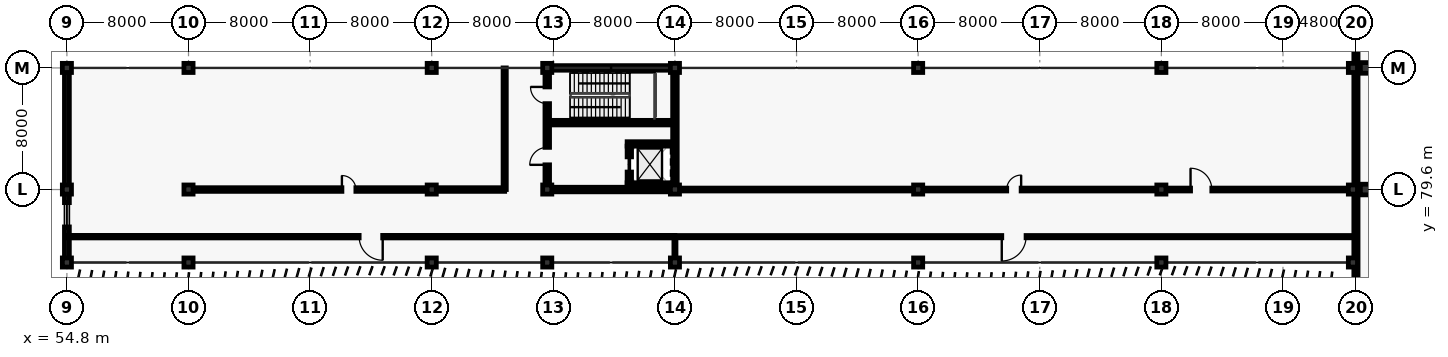
"""IFC4 building model, lengths in metres.
Left out: names, types, materials, properties, quantities, classifications, styles, units other than length and angle.
Written with IfcOpenShell. Run it as: python <this file> out.ifc"""

import sys

from ifc_helpers import new_model, si_unit, direction, frame, frame_2d, origin, origin_2d, place, context, subcontext, project, spatial, rectangle, extrude, element, fill, save


model = new_model("IFC4")
c1 = context("Model", 3, precision=1e-05, world=origin(), true_north=direction((0.0, 1.0)))
c2 = subcontext(c1, "Body", "Model", "MODEL_VIEW")
j1 = project(units=[si_unit("LENGTHUNIT", "METRE"), si_unit("PLANEANGLEUNIT", "RADIAN")], contexts=[c1])
p1 = place(None, origin())
s1 = spatial("IfcSite", under=j1, at=p1, CompositionType="ELEMENT")
p2 = place(p1, origin())
s2 = spatial("IfcBuilding", under=s1, at=p2, CompositionType="ELEMENT")
p3 = place(p2, frame((0.0, 0.0, 5.4)))
s3 = spatial("IfcBuildingStorey", under=s2, at=p3, CompositionType="ELEMENT", Elevation=5.4)
for number, where, z_axis, x_axis in (
    (1, (54.8, 74.8, 0.0), (0.0, 0.0, 1.0), (1.0, 0.0, 0.0)),
    (2, (54.8, 79.6, 0.0), (0.0, 0.0, 1.0), (1.0, 0.0, 0.0)),
    (3, (54.8, 87.6, 0.0), (0.0, 0.0, 1.0), (1.0, 0.0, 0.0)),
    (4, (62.8, 74.8, 0.0), (0.0, 0.0, 1.0), (1.0, 0.0, 0.0)),
    (5, (62.8, 79.6, 0.0), (0.0, 0.0, 1.0), (1.0, 0.0, 0.0)),
    (6, (62.8, 87.6, 0.0), (0.0, 0.0, 1.0), (1.0, 0.0, 0.0)),
    (7, (78.8, 74.8, 0.0), (0.0, 0.0, 1.0), (1.0, 0.0, 0.0)),
    (8, (78.8, 79.6, 0.0), (0.0, 0.0, 1.0), (1.0, 0.0, 0.0)),
    (9, (78.8, 87.6, 0.0), (0.0, 0.0, 1.0), (1.0, 0.0, 0.0)),
    (10, (86.4, 74.8, 0.0), (0.0, 0.0, 1.0), (1.0, 0.0, 0.0)),
    (11, (86.4, 79.6, 0.0), (0.0, 0.0, 1.0), (1.0, 0.0, 0.0)),
    (12, (86.4, 87.6, 0.0), (0.0, 0.0, 1.0), (1.0, 0.0, 0.0)),
    (13, (94.8, 74.8, 0.0), (0.0, 0.0, 1.0), (1.0, 0.0, 0.0)),
    (14, (94.8, 79.6, 0.0), (0.0, 0.0, 1.0), (1.0, 0.0, 0.0)),
    (15, (94.8, 87.6, 0.0), (0.0, 0.0, 1.0), (1.0, 0.0, 0.0)),
    (16, (110.8, 74.8, 0.0), (0.0, 0.0, 1.0), (1.0, 0.0, 0.0)),
    (17, (110.8, 79.6, 0.0), (0.0, 0.0, 1.0), (1.0, 0.0, 0.0)),
    (18, (110.8, 87.6, 0.0), (0.0, 0.0, 1.0), (1.0, 0.0, 0.0)),
    (19, (126.8, 74.8, 0.0), (0.0, 0.0, 1.0), (1.0, 0.0, 0.0)),
    (20, (126.8, 79.6, 0.0), (0.0, 0.0, 1.0), (1.0, 0.0, 0.0)),
    (21, (126.8, 87.6, 0.0), (0.0, 0.0, 1.0), (1.0, 0.0, 0.0)),
    (22, (139.4, 74.8, 0.0), (0.0, 0.0, 1.0), (1.0, 0.0, 0.0)),
    (23, (139.4, 79.6, 0.0), (0.0, 0.0, 1.0), (1.0, 0.0, 0.0)),
    (24, (139.4, 87.6, 0.0), (0.0, 0.0, 1.0), (1.0, 0.0, 0.0)),
):
    element("IfcColumn", number, at=place(p3, frame(where, z_axis=z_axis, x_axis=x_axis)), inside=s3, PredefinedType="COLUMN", context=c2, shape_type="SweptSolid", body=[
        extrude(rectangle(XDim=0.6, YDim=0.6, at=origin_2d()), origin(), (0.0, 0.0, 1.0), 4.8),
    ])
for number, where, z_axis, x_axis in (
    (25, (140.24, 79.6, 0.0), (0.0, 0.0, 1.0), (1.0, 0.0, 0.0)),
    (26, (140.24, 87.6, 0.0), (0.0, 0.0, 1.0), (1.0, 0.0, 0.0)),
):
    element("IfcColumn", number, at=place(p3, frame(where, z_axis=z_axis, x_axis=x_axis)), inside=s3, PredefinedType="COLUMN", context=c2, shape_type="SweptSolid", body=[
        extrude(rectangle(XDim=0.7, YDim=0.7, at=origin_2d()), origin(), (0.0, 0.0, 1.0), 4.8),
    ])
p4 = place(p3, frame((54.8, 74.94, 0.0), z_axis=(0.0, 0.0, 1.0), x_axis=(0.0, 1.0, 0.0)))
e27 = element("IfcWall", 27, at=p4, inside=s3, PredefinedType="SOLIDWALL", context=c2, shape_type="SweptSolid", body=[
    extrude(rectangle(XDim=12.52, YDim=0.32, at=frame_2d((6.26, 0.0))), origin(), (0.0, 0.0, 1.0), 3.69),
])
p5 = place(p4, frame((2.2, 0.0, 0.8)))
e28 = element("IfcOpeningElement", 28, at=p5, cuts=e27, PredefinedType="OPENING", context=c2, shape_type="SweptSolid", body=[
    extrude(rectangle(XDim=1.6, YDim=1.65, at=frame_2d((0.8, 0.825))), frame((0.0, 0.17, 0.0), z_axis=(0.0, -1.0, 0.0), x_axis=(1.0, 0.0, 0.0)), (0.0, 0.0, 1.0), 0.34),
])
p6 = place(p3, frame((139.6, 71.74, 0.0), z_axis=(0.0, 0.0, 1.0), x_axis=(0.0, 1.0, 0.0)))
e29 = element("IfcWall", 29, at=p6, inside=s3, PredefinedType="SOLIDWALL", context=c2, shape_type="SweptSolid", body=[
    extrude(rectangle(XDim=46.12, YDim=0.275, at=frame_2d((23.06, 0.0))), origin(), (0.0, 0.0, 1.0), 3.69),
])
p7 = place(p6, frame((31.38, 0.0, 0.0)))
e30 = element("IfcOpeningElement", 30, at=p7, cuts=e29, PredefinedType="OPENING", context=c2, shape_type="SweptSolid", body=[
    extrude(rectangle(XDim=1.4, YDim=2.25, at=frame_2d((0.7, 1.125))), frame((0.0, 0.147, 0.0), z_axis=(0.0, -1.0, 0.0), x_axis=(1.0, 0.0, 0.0)), (0.0, 0.0, 1.0), 0.295),
])
for number, where, z_axis, x_axis in (
    (31, (86.702, 79.6, 0.0), (0.0, 0.0, 1.0), (1.0, 0.0, 0.0)),
    (32, (86.702, 87.6, 0.0), (0.0, 0.0, 1.0), (1.0, 0.0, 0.0)),
):
    element("IfcWall", number, at=place(p3, frame(where, z_axis=z_axis, x_axis=x_axis)), inside=s3, PredefinedType="SHEAR", context=c2, shape_type="SweptSolid", body=[
        extrude(rectangle(XDim=7.796, YDim=0.3, at=frame_2d((3.898, 0.0))), origin(), (0.0, 0.0, 1.0), 4.54),
    ])
p8 = place(p3, frame((86.4, 79.902, 0.0), z_axis=(0.0, 0.0, 1.0), x_axis=(0.0, 1.0, 0.0)))
e33 = element("IfcWall", 33, at=p8, inside=s3, PredefinedType="SHEAR", context=c2, shape_type="SweptSolid", body=[
    extrude(rectangle(XDim=7.396, YDim=0.3, at=frame_2d((3.698, 0.0))), origin(), (0.0, 0.0, 1.0), 4.54),
])
p9 = place(p8, frame((5.348, 0.0, 0.0)))
e34 = element("IfcOpeningElement", 34, at=p9, cuts=e33, PredefinedType="OPENING", context=c2, shape_type="SweptSolid", body=[
    extrude(rectangle(XDim=1.1, YDim=2.15, at=frame_2d((0.55, 1.075))), frame((0.0, 0.16, 0.0), z_axis=(0.0, -1.0, 0.0), x_axis=(1.0, 0.0, 0.0)), (0.0, 0.0, 1.0), 0.32),
])
p10 = place(p8, frame((1.323, 0.0, 0.0)))
e35 = element("IfcOpeningElement", 35, at=p10, cuts=e33, PredefinedType="OPENING", context=c2, shape_type="SweptSolid", body=[
    extrude(rectangle(XDim=1.15, YDim=2.2, at=frame_2d((0.575, 1.1))), frame((0.0, 0.16, 0.0), z_axis=(0.0, -1.0, 0.0), x_axis=(1.0, 0.0, 0.0)), (0.0, 0.0, 1.0), 0.32),
])
p11 = place(p3, frame((94.8, 79.902, 0.0), z_axis=(0.0, 0.0, 1.0), x_axis=(0.0, 1.0, 0.0)))
e36 = element("IfcWall", 36, at=p11, inside=s3, PredefinedType="SHEAR", context=c2, shape_type="SweptSolid", body=[
    extrude(rectangle(XDim=7.396, YDim=0.3, at=frame_2d((3.698, 0.0))), origin(), (0.0, 0.0, 1.0), 4.54),
])
p12 = place(p3, frame((86.55, 84.0, 0.0), z_axis=(0.0, 0.0, 1.0), x_axis=(1.0, 0.0, 0.0)))
e37 = element("IfcWall", 37, at=p12, inside=s3, PredefinedType="SHEAR", context=c2, shape_type="SweptSolid", body=[
    extrude(rectangle(XDim=8.1, YDim=0.3, at=frame_2d((4.05, 0.0))), origin(), (0.0, 0.0, 1.0), 4.54),
])
p13 = place(p3, frame((91.655, 79.9, 0.0), z_axis=(0.0, 0.0, 1.0), x_axis=(1.0, 0.0, 0.0)))
e38 = element("IfcWall", 38, at=p13, inside=s3, PredefinedType="SHEAR", context=c2, shape_type="SweptSolid", body=[
    extrude(rectangle(XDim=2.843, YDim=0.29, at=frame_2d((1.421, 0.0))), origin(), (0.0, 0.0, 1.0), 4.54),
])
p14 = place(p3, frame((91.655, 82.6, 0.0), z_axis=(0.0, 0.0, 1.0), x_axis=(1.0, 0.0, 0.0)))
e39 = element("IfcWall", 39, at=p14, inside=s3, PredefinedType="SHEAR", context=c2, shape_type="SweptSolid", body=[
    extrude(rectangle(XDim=2.99, YDim=0.29, at=frame_2d((1.495, 0.0))), origin(), (0.0, 0.0, 1.0), 4.54),
])
p15 = place(p3, frame((91.8, 80.045, 0.0), z_axis=(0.0, 0.0, 1.0), x_axis=(0.0, 1.0, 0.0)))
e40 = element("IfcWall", 40, at=p15, inside=s3, PredefinedType="SHEAR", context=c2, shape_type="SweptSolid", body=[
    extrude(rectangle(XDim=2.41, YDim=0.29, at=frame_2d((1.205, 0.0))), origin(), (0.0, 0.0, 1.0), 4.54),
])
p16 = place(p15, frame((0.705, 0.0, 0.0)))
e41 = element("IfcOpeningElement", 41, at=p16, cuts=e40, PredefinedType="OPENING", context=c2, shape_type="SweptSolid", body=[
    extrude(rectangle(XDim=1.0, YDim=2.15, at=frame_2d((0.5, 1.075))), frame((0.0, 0.155, 0.0), z_axis=(0.0, -1.0, 0.0), x_axis=(1.0, 0.0, 0.0)), (0.0, 0.0, 1.0), 0.31),
])
p17 = place(p3, frame((94.8, 76.5, 0.0), z_axis=(0.0, 0.0, 1.0), x_axis=(-1.0, 0.0, 0.0)))
e42 = element("IfcWall", 42, at=p17, inside=s3, PredefinedType="PARTITIONING", context=c2, shape_type="SweptSolid", body=[
    extrude(rectangle(XDim=40.0, YDim=0.165, at=frame_2d((20.0, 0.0))), origin(), (0.0, 0.0, 1.0), 4.54),
])
p18 = place(p17, frame((19.225, 0.0, 0.0)))
e43 = element("IfcOpeningElement", 43, at=p18, cuts=e42, PredefinedType="OPENING", context=c2, shape_type="SweptSolid", body=[
    extrude(rectangle(XDim=1.55, YDim=2.25, at=frame_2d((0.775, 1.125))), frame((0.0, 0.093, 0.0), z_axis=(0.0, -1.0, 0.0), x_axis=(1.0, 0.0, 0.0)), (0.0, 0.0, 1.0), 0.185),
])
p19 = place(p3, frame((139.4, 76.5, 0.0), z_axis=(0.0, 0.0, 1.0), x_axis=(-1.0, 0.0, 0.0)))
e44 = element("IfcWall", 44, at=p19, inside=s3, PredefinedType="PARTITIONING", context=c2, shape_type="SweptSolid", body=[
    extrude(rectangle(XDim=44.6, YDim=0.15, at=frame_2d((22.3, 0.0))), origin(), (0.0, 0.0, 1.0), 4.54),
])
p20 = place(p19, frame((21.5, 0.0, 0.0)))
e45 = element("IfcOpeningElement", 45, at=p20, cuts=e44, PredefinedType="OPENING", context=c2, shape_type="SweptSolid", body=[
    extrude(rectangle(XDim=1.6, YDim=2.3, at=frame_2d((0.8, 1.15))), frame((0.0, 0.085, 0.0), z_axis=(0.0, -1.0, 0.0), x_axis=(1.0, 0.0, 0.0)), (0.0, 0.0, 1.0), 0.17),
])
p21 = place(p3, frame((63.102, 79.6, 0.0), z_axis=(0.0, 0.0, 1.0), x_axis=(1.0, 0.0, 0.0)))
e46 = element("IfcWall", 46, at=p21, inside=s3, PredefinedType="PARTITIONING", context=c2, shape_type="SweptSolid", body=[
    extrude(rectangle(XDim=20.498, YDim=0.24, at=frame_2d((10.249, 0.0))), origin(), (0.0, 0.0, 1.0), 3.89),
])
p22 = place(p21, frame((9.789, 0.0, 0.0)))
e47 = element("IfcOpeningElement", 47, at=p22, cuts=e46, PredefinedType="OPENING", context=c2, shape_type="SweptSolid", body=[
    extrude(rectangle(XDim=0.92, YDim=2.1, at=frame_2d((0.46, 1.05))), frame((0.0, 0.13, 0.0), z_axis=(0.0, -1.0, 0.0), x_axis=(1.0, 0.0, 0.0)), (0.0, 0.0, 1.0), 0.26),
])
p23 = place(p3, frame((83.6, 79.6, 0.0), z_axis=(0.0, 0.0, 1.0), x_axis=(0.0, 1.0, 0.0)))
e48 = element("IfcWall", 48, at=p23, inside=s3, PredefinedType="PARTITIONING", context=c2, shape_type="SweptSolid", body=[
    extrude(rectangle(XDim=8.0, YDim=0.21, at=frame_2d((4.0, 0.0))), origin(), (0.0, 0.0, 1.0), 4.54),
])
p24 = place(p3, frame((95.102, 79.6, 0.0), z_axis=(0.0, 0.0, 1.0), x_axis=(1.0, 0.0, 0.0)))
e49 = element("IfcWall", 49, at=p24, inside=s3, PredefinedType="PARTITIONING", context=c2, shape_type="SweptSolid", body=[
    extrude(rectangle(XDim=43.996, YDim=0.19, at=frame_2d((21.998, 0.0))), origin(), (0.0, 0.0, 1.0), 3.89),
])
p25 = place(p24, frame((21.523, 0.0, 0.0)))
e50 = element("IfcOpeningElement", 50, at=p25, cuts=e49, PredefinedType="OPENING", context=c2, shape_type="SweptSolid", body=[
    extrude(rectangle(XDim=0.95, YDim=2.1, at=frame_2d((0.475, 1.05))), frame((0.0, 0.105, 0.0), z_axis=(0.0, -1.0, 0.0), x_axis=(1.0, 0.0, 0.0)), (0.0, 0.0, 1.0), 0.21),
])
p26 = place(p24, frame((33.617, 0.0, 0.0)))
e51 = element("IfcOpeningElement", 51, at=p26, cuts=e49, PredefinedType="OPENING", context=c2, shape_type="SweptSolid", body=[
    extrude(rectangle(XDim=1.4, YDim=2.25, at=frame_2d((0.7, 1.125))), frame((0.0, 0.105, 0.0), z_axis=(0.0, -1.0, 0.0), x_axis=(1.0, 0.0, 0.0)), (0.0, 0.0, 1.0), 0.21),
])
p27 = place(p3, frame((94.8, 76.5, 0.0), z_axis=(0.0, 0.0, 1.0), x_axis=(0.0, -1.0, 0.0)))
e52 = element("IfcWall", 52, at=p27, inside=s3, PredefinedType="PARTITIONING", context=c2, shape_type="SweptSolid", body=[
    extrude(rectangle(XDim=1.398, YDim=0.135, at=frame_2d((0.699, 0.0))), origin(), (0.0, 0.0, 1.0), 3.79),
])
p28 = place(p5, origin())
e53 = element("IfcWindow", 53, at=p28, inside=s3, PartitioningType="SINGLE_PANEL", PredefinedType="WINDOW", context=c2, shape_type="SweptSolid", body=[
    extrude(rectangle(XDim=1.6, YDim=1.65, at=frame_2d((0.8, 0.825))), frame((0.0, 0.03, 0.0), z_axis=(0.0, -1.0, 0.0), x_axis=(1.0, 0.0, 0.0)), (0.0, 0.0, 1.0), 0.06),
])
fill(e28, e53)
p29 = place(p9, origin())
e54 = element("IfcDoor", 54, at=p29, inside=s3, OperationType="SINGLE_SWING_RIGHT", PredefinedType="DOOR", context=c2, shape_type="SweptSolid", body=[
    extrude(rectangle(XDim=1.1, YDim=2.15, at=frame_2d((0.55, 1.075))), frame((0.0, 0.025, 0.0), z_axis=(0.0, -1.0, 0.0), x_axis=(1.0, 0.0, 0.0)), (0.0, 0.0, 1.0), 0.05),
])
fill(e34, e54)
p30 = place(p10, origin())
e55 = element("IfcDoor", 55, at=p30, inside=s3, OperationType="SINGLE_SWING_LEFT", PredefinedType="DOOR", context=c2, shape_type="SweptSolid", body=[
    extrude(rectangle(XDim=1.15, YDim=2.2, at=frame_2d((0.575, 1.1))), frame((0.0, 0.025, 0.0), z_axis=(0.0, -1.0, 0.0), x_axis=(1.0, 0.0, 0.0)), (0.0, 0.0, 1.0), 0.05),
])
fill(e35, e55)
p31 = place(p16, origin())
e56 = element("IfcDoor", 56, at=p31, inside=s3, OperationType="SLIDING_TO_LEFT", PredefinedType="DOOR", context=c2, shape_type="SweptSolid", body=[
    extrude(rectangle(XDim=1.0, YDim=2.15, at=frame_2d((0.5, 1.075))), frame((0.0, 0.025, 0.0), z_axis=(0.0, -1.0, 0.0), x_axis=(1.0, 0.0, 0.0)), (0.0, 0.0, 1.0), 0.05),
])
fill(e41, e56)
p32 = place(p18, origin())
e57 = element("IfcDoor", 57, at=p32, inside=s3, OperationType="SINGLE_SWING_LEFT", PredefinedType="DOOR", context=c2, shape_type="SweptSolid", body=[
    extrude(rectangle(XDim=1.55, YDim=2.25, at=frame_2d((0.775, 1.125))), frame((0.0, 0.025, 0.0), z_axis=(0.0, -1.0, 0.0), x_axis=(1.0, 0.0, 0.0)), (0.0, 0.0, 1.0), 0.05),
])
fill(e43, e57)
p33 = place(p20, origin())
e58 = element("IfcDoor", 58, at=p33, inside=s3, OperationType="SINGLE_SWING_RIGHT", PredefinedType="DOOR", context=c2, shape_type="SweptSolid", body=[
    extrude(rectangle(XDim=1.6, YDim=2.3, at=frame_2d((0.8, 1.15))), frame((0.0, 0.025, 0.0), z_axis=(0.0, -1.0, 0.0), x_axis=(1.0, 0.0, 0.0)), (0.0, 0.0, 1.0), 0.05),
])
fill(e45, e58)
p34 = place(p22, origin())
e59 = element("IfcDoor", 59, at=p34, inside=s3, OperationType="SINGLE_SWING_LEFT", PredefinedType="DOOR", context=c2, shape_type="SweptSolid", body=[
    extrude(rectangle(XDim=0.92, YDim=2.1, at=frame_2d((0.46, 1.05))), frame((0.0, 0.025, 0.0), z_axis=(0.0, -1.0, 0.0), x_axis=(1.0, 0.0, 0.0)), (0.0, 0.0, 1.0), 0.05),
])
fill(e47, e59)
p35 = place(p25, origin())
e60 = element("IfcDoor", 60, at=p35, inside=s3, OperationType="SINGLE_SWING_RIGHT", PredefinedType="DOOR", context=c2, shape_type="SweptSolid", body=[
    extrude(rectangle(XDim=0.95, YDim=2.1, at=frame_2d((0.475, 1.05))), frame((0.0, 0.025, 0.0), z_axis=(0.0, -1.0, 0.0), x_axis=(1.0, 0.0, 0.0)), (0.0, 0.0, 1.0), 0.05),
])
fill(e50, e60)
p36 = place(p26, origin())
e61 = element("IfcDoor", 61, at=p36, inside=s3, OperationType="SINGLE_SWING_LEFT", PredefinedType="DOOR", context=c2, shape_type="SweptSolid", body=[
    extrude(rectangle(XDim=1.4, YDim=2.25, at=frame_2d((0.7, 1.125))), frame((0.0, 0.025, 0.0), z_axis=(0.0, -1.0, 0.0), x_axis=(1.0, 0.0, 0.0)), (0.0, 0.0, 1.0), 0.05),
])
fill(e51, e61)
save(model, sys.argv[1])
